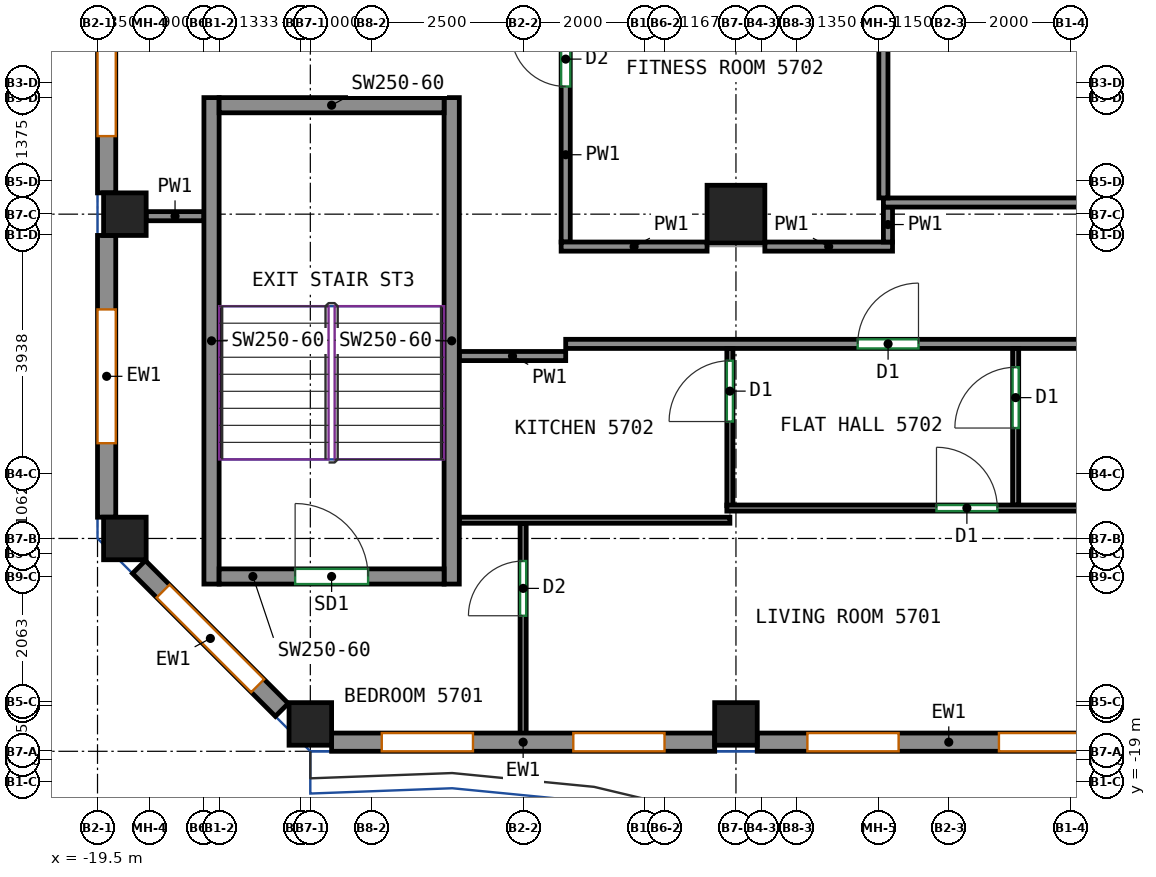
"""IFC4 building model, lengths in metres.
Left out: names, types, materials, properties, quantities, classifications, styles, units other than length and angle.
Written with IfcOpenShell. Run it as: python <this file> out.ifc"""

import sys

from ifc_helpers import new_model, si_unit, direction, frame, frame_2d, origin, origin_2d, place, context, subcontext, project, spatial, rectangle, extrude, source, transform, mapped, element, fill, save


model = new_model("IFC4")
c1 = context("Model", 3, precision=1e-05, world=origin(), true_north=direction((0.0, 1.0)))
c2 = subcontext(c1, "Body", "Model", "MODEL_VIEW")
j1 = project(units=[si_unit("LENGTHUNIT", "METRE"), si_unit("PLANEANGLEUNIT", "RADIAN")], contexts=[c1])
p1 = place(None, origin())
s1 = spatial("IfcSite", under=j1, at=p1, CompositionType="ELEMENT")
p2 = place(p1, origin())
s2 = spatial("IfcBuilding", under=s1, at=p2, CompositionType="ELEMENT")
p3 = place(p2, frame((0.0, 0.0, 239.0)))
s3 = spatial("IfcBuildingStorey", under=s2, at=p3, CompositionType="ELEMENT", Elevation=239.0)
m1 = source(origin(), c2, "Body", "SweptSolid", [
    extrude(rectangle(XDim=0.7, YDim=0.7, at=origin_2d()), origin(), (0.0, 0.0, 1.0), 3.12),
])
for number, where, z_axis, x_axis in (
    (1, (-19.05, -15.0, 0.0), (0.0, 0.0, 1.0), (1.0, 0.0, 0.0)),
    (2, (-19.05, -9.667, 0.0), (0.0, 0.0, 1.0), (1.0, 0.0, 0.0)),
    (3, (-16.0, -18.05, 0.0), (0.0, 0.0, 1.0), (1.0, 0.0, 0.0)),
    (4, (-9.0, -18.05, 0.0), (0.0, 0.0, 1.0), (1.0, 0.0, 0.0)),
):
    element("IfcColumn", number, at=place(p3, frame(where, z_axis=z_axis, x_axis=x_axis)), inside=s3, PredefinedType="COLUMN", context=c2, shape_type="MappedRepresentation", body=[
        mapped(m1, transform((0.0, 0.0, 0.0))),
    ])
m2 = source(origin(), c2, "Body", "SweptSolid", [
    extrude(rectangle(XDim=0.95, YDim=0.95, at=origin_2d()), origin(), (0.0, 0.0, 1.0), 3.12),
])
p4 = place(p3, frame((-9.0, -9.667, 0.0), z_axis=(0.0, 0.0, 1.0), x_axis=(1.0, 0.0, 0.0)))
e5 = element("IfcColumn", 5, at=p4, inside=s3, PredefinedType="COLUMN", context=c2, shape_type="MappedRepresentation", body=[
    mapped(m2, transform((0.0, 0.0, 0.0))),
])
m3 = source(origin(), c2, "Body", "SweptSolid", [
    extrude(rectangle(XDim=8.0, YDim=0.25, at=frame_2d((4.0, 0.0))), origin(), (0.0, 0.0, 1.0), 3.12),
])
for number, where, z_axis, x_axis in (
    (6, (-17.625, -15.75, 0.0), (0.0, 0.0, 1.0), (0.0, 1.0, 0.0)),
    (7, (-13.675, -15.75, 0.0), (0.0, 0.0, 1.0), (0.0, 1.0, 0.0)),
):
    element("IfcWall", number, at=place(p3, frame(where, z_axis=z_axis, x_axis=x_axis)), inside=s3, PredefinedType="SHEAR", context=c2, shape_type="MappedRepresentation", body=[
        mapped(m3, transform((0.0, 0.0, 0.0))),
    ])
m4 = source(origin(), c2, "Body", "SweptSolid", [
    extrude(rectangle(XDim=3.7, YDim=0.25, at=frame_2d((1.85, 0.0))), origin(), (0.0, 0.0, 1.0), 3.12),
])
p5 = place(p3, frame((-17.5, -15.625, 0.0), z_axis=(0.0, 0.0, 1.0), x_axis=(1.0, 0.0, 0.0)))
e8 = element("IfcWall", 8, at=p5, inside=s3, PredefinedType="SHEAR", context=c2, shape_type="MappedRepresentation", body=[
    mapped(m4, transform((0.0, 0.0, 0.0))),
])
p6 = place(p5, frame((1.25, 0.0, 0.0)))
e9 = element("IfcOpeningElement", 9, at=p6, cuts=e8, PredefinedType="OPENING", context=c2, shape_type="SweptSolid", body=[
    extrude(rectangle(XDim=1.2, YDim=2.1, at=frame_2d((0.6, 1.05))), frame((0.0, 0.135, 0.0), z_axis=(0.0, -1.0, 0.0), x_axis=(1.0, 0.0, 0.0)), (0.0, 0.0, 1.0), 0.27),
])
p7 = place(p3, frame((-17.5, -7.875, 0.0), z_axis=(0.0, 0.0, 1.0), x_axis=(1.0, 0.0, 0.0)))
e10 = element("IfcWall", 10, at=p7, inside=s3, PredefinedType="SHEAR", context=c2, shape_type="MappedRepresentation", body=[
    mapped(m4, transform((0.0, 0.0, 0.0))),
])
m5 = source(origin(), c2, "Body", "SweptSolid", [
    extrude(rectangle(XDim=6.3, YDim=0.3, at=frame_2d((3.15, 0.0))), origin(), (0.0, 0.0, 1.0), 3.12),
])
p8 = place(p3, frame((-15.65, -18.35, 0.0), z_axis=(0.0, 0.0, 1.0), x_axis=(1.0, 0.0, 0.0)))
e11 = element("IfcWall", 11, at=p8, inside=s3, PredefinedType="SOLIDWALL", context=c2, shape_type="MappedRepresentation", body=[
    mapped(m5, transform((0.0, 0.0, 0.0))),
])
p9 = place(p8, frame((0.825, 0.0, 0.8)))
e12 = element("IfcOpeningElement", 12, at=p9, cuts=e11, PredefinedType="OPENING", context=c2, shape_type="SweptSolid", body=[
    extrude(rectangle(XDim=1.5, YDim=2.05, at=frame_2d((0.75, 1.025))), frame((0.0, 0.16, 0.0), z_axis=(0.0, -1.0, 0.0), x_axis=(1.0, 0.0, 0.0)), (0.0, 0.0, 1.0), 0.32),
])
p10 = place(p8, frame((3.975, 0.0, 0.8)))
e13 = element("IfcOpeningElement", 13, at=p10, cuts=e11, PredefinedType="OPENING", context=c2, shape_type="SweptSolid", body=[
    extrude(rectangle(XDim=1.5, YDim=2.05, at=frame_2d((0.75, 1.025))), frame((0.0, 0.16, 0.0), z_axis=(0.0, -1.0, 0.0), x_axis=(1.0, 0.0, 0.0)), (0.0, 0.0, 1.0), 0.32),
])
p11 = place(p3, frame((-8.65, -18.35, 0.0), z_axis=(0.0, 0.0, 1.0), x_axis=(1.0, 0.0, 0.0)))
e14 = element("IfcWall", 14, at=p11, inside=s3, PredefinedType="SOLIDWALL", context=c2, shape_type="MappedRepresentation", body=[
    mapped(m5, transform((0.0, 0.0, 0.0))),
])
p12 = place(p11, frame((0.825, 0.0, 0.8)))
e15 = element("IfcOpeningElement", 15, at=p12, cuts=e14, PredefinedType="OPENING", context=c2, shape_type="SweptSolid", body=[
    extrude(rectangle(XDim=1.5, YDim=2.05, at=frame_2d((0.75, 1.025))), frame((0.0, 0.16, 0.0), z_axis=(0.0, -1.0, 0.0), x_axis=(1.0, 0.0, 0.0)), (0.0, 0.0, 1.0), 0.32),
])
p13 = place(p11, frame((3.975, 0.0, 0.8)))
e16 = element("IfcOpeningElement", 16, at=p13, cuts=e14, PredefinedType="OPENING", context=c2, shape_type="SweptSolid", body=[
    extrude(rectangle(XDim=1.5, YDim=2.05, at=frame_2d((0.75, 1.025))), frame((0.0, 0.16, 0.0), z_axis=(0.0, -1.0, 0.0), x_axis=(1.0, 0.0, 0.0)), (0.0, 0.0, 1.0), 0.32),
])
m6 = source(origin(), c2, "Body", "SweptSolid", [
    extrude(rectangle(XDim=8.133, YDim=0.3, at=frame_2d((4.067, 0.0))), origin(), (0.0, 0.0, 1.0), 3.12),
])
p14 = place(p3, frame((-19.35, -1.183, 0.0), z_axis=(0.0, 0.0, 1.0), x_axis=(0.0, -1.0, 0.0)))
e17 = element("IfcWall", 17, at=p14, inside=s3, PredefinedType="SOLIDWALL", context=c2, shape_type="MappedRepresentation", body=[
    mapped(m6, transform((0.0, 0.0, 0.0))),
])
p15 = place(p14, frame((0.933, 0.0, 0.8)))
e18 = element("IfcOpeningElement", 18, at=p15, cuts=e17, PredefinedType="OPENING", context=c2, shape_type="SweptSolid", body=[
    extrude(rectangle(XDim=2.2, YDim=2.05, at=frame_2d((1.1, 1.025))), frame((0.0, 0.16, 0.0), z_axis=(0.0, -1.0, 0.0), x_axis=(1.0, 0.0, 0.0)), (0.0, 0.0, 1.0), 0.32),
])
p16 = place(p14, frame((5.0, 0.0, 0.8)))
e19 = element("IfcOpeningElement", 19, at=p16, cuts=e17, PredefinedType="OPENING", context=c2, shape_type="SweptSolid", body=[
    extrude(rectangle(XDim=2.2, YDim=2.05, at=frame_2d((1.1, 1.025))), frame((0.0, 0.16, 0.0), z_axis=(0.0, -1.0, 0.0), x_axis=(1.0, 0.0, 0.0)), (0.0, 0.0, 1.0), 0.32),
])
m7 = source(origin(), c2, "Body", "SweptSolid", [
    extrude(rectangle(XDim=4.633, YDim=0.3, at=frame_2d((2.317, 0.0))), origin(), (0.0, 0.0, 1.0), 3.12),
])
p17 = place(p3, frame((-19.35, -10.017, 0.0), z_axis=(0.0, 0.0, 1.0), x_axis=(0.0, -1.0, 0.0)))
e20 = element("IfcWall", 20, at=p17, inside=s3, PredefinedType="SOLIDWALL", context=c2, shape_type="MappedRepresentation", body=[
    mapped(m7, transform((0.0, 0.0, 0.0))),
])
p18 = place(p17, frame((1.217, 0.0, 0.8)))
e21 = element("IfcOpeningElement", 21, at=p18, cuts=e20, PredefinedType="OPENING", context=c2, shape_type="SweptSolid", body=[
    extrude(rectangle(XDim=2.2, YDim=2.05, at=frame_2d((1.1, 1.025))), frame((0.0, 0.16, 0.0), z_axis=(0.0, -1.0, 0.0), x_axis=(1.0, 0.0, 0.0)), (0.0, 0.0, 1.0), 0.32),
])
m8 = source(origin(), c2, "Body", "SweptSolid", [
    extrude(rectangle(XDim=3.323, YDim=0.3, at=frame_2d((1.662, 0.0))), origin(), (0.0, 0.0, 1.0), 3.12),
])
p19 = place(p3, frame((-18.819, -15.469, 0.0), z_axis=(0.0, 0.0, 1.0), x_axis=(0.707070049321, -0.707143511144, 0.0)))
e22 = element("IfcWall", 22, at=p19, inside=s3, PredefinedType="SOLIDWALL", context=c2, shape_type="MappedRepresentation", body=[
    mapped(m8, transform((0.0, 0.0, 0.0))),
])
p20 = place(p19, frame((0.562, 0.0, 0.8)))
e23 = element("IfcOpeningElement", 23, at=p20, cuts=e22, PredefinedType="OPENING", context=c2, shape_type="SweptSolid", body=[
    extrude(rectangle(XDim=2.2, YDim=2.05, at=frame_2d((1.1, 1.025))), frame((0.0, 0.16, 0.0), z_axis=(0.0, -1.0, 0.0), x_axis=(1.0, 0.0, 0.0)), (0.0, 0.0, 1.0), 0.32),
])
p21 = place(p3, frame((-11.8, -11.8, 0.0), z_axis=(0.0, 0.0, 1.0), x_axis=(1.0, 0.0, 0.0)))
e24 = element("IfcWall", 24, at=p21, inside=s3, PredefinedType="PARTITIONING", context=c2, shape_type="SweptSolid", body=[
    extrude(rectangle(XDim=29.55, YDim=0.15, at=frame_2d((14.775, 0.0))), origin(), (0.0, 0.0, 1.0), 3.12),
])
p22 = place(p21, frame((4.802, 0.0, 0.0)))
e25 = element("IfcOpeningElement", 25, at=p22, cuts=e24, PredefinedType="OPENING", context=c2, shape_type="SweptSolid", body=[
    extrude(rectangle(XDim=1.0, YDim=2.1, at=frame_2d((0.5, 1.05))), frame((0.0, 0.085, 0.0), z_axis=(0.0, -1.0, 0.0), x_axis=(1.0, 0.0, 0.0)), (0.0, 0.0, 1.0), 0.17),
])
p23 = place(p21, frame((23.314, 0.0, 0.0)))
e26 = element("IfcOpeningElement", 26, at=p23, cuts=e24, PredefinedType="OPENING", context=c2, shape_type="SweptSolid", body=[
    extrude(rectangle(XDim=1.0, YDim=2.1, at=frame_2d((0.5, 1.05))), frame((0.0, 0.085, 0.0), z_axis=(0.0, -1.0, 0.0), x_axis=(1.0, 0.0, 0.0)), (0.0, 0.0, 1.0), 0.17),
])
p24 = place(p3, frame((-13.55, -12.0, 0.0), z_axis=(0.0, 0.0, 1.0), x_axis=(1.0, 0.0, 0.0)))
e27 = element("IfcWall", 27, at=p24, inside=s3, PredefinedType="PARTITIONING", context=c2, shape_type="SweptSolid", body=[
    extrude(rectangle(XDim=1.75, YDim=0.15, at=frame_2d((0.875, 0.0))), origin(), (0.0, 0.0, 1.0), 3.12),
])
p25 = place(p3, frame((-18.7, -9.7, 0.0), z_axis=(0.0, 0.0, 1.0), x_axis=(1.0, 0.0, 0.0)))
e28 = element("IfcWall", 28, at=p25, inside=s3, PredefinedType="PARTITIONING", context=c2, shape_type="SweptSolid", body=[
    extrude(rectangle(XDim=0.95, YDim=0.15, at=frame_2d((0.475, 0.0))), origin(), (0.0, 0.0, 1.0), 3.12),
])
p26 = place(p3, frame((-11.8, -10.125, 0.0), z_axis=(0.0, 0.0, 1.0), x_axis=(0.0, 1.0, 0.0)))
e29 = element("IfcWall", 29, at=p26, inside=s3, PredefinedType="PARTITIONING", context=c2, shape_type="SweptSolid", body=[
    extrude(rectangle(XDim=4.785, YDim=0.15, at=frame_2d((2.393, 0.0))), origin(), (0.0, 0.0, 1.0), 3.12),
])
p27 = place(p26, frame((2.558, 0.0, 0.0)))
e30 = element("IfcOpeningElement", 30, at=p27, cuts=e29, PredefinedType="OPENING", context=c2, shape_type="SweptSolid", body=[
    extrude(rectangle(XDim=0.9, YDim=2.1, at=frame_2d((0.45, 1.05))), frame((0.0, 0.085, 0.0), z_axis=(0.0, -1.0, 0.0), x_axis=(1.0, 0.0, 0.0)), (0.0, 0.0, 1.0), 0.17),
])
p28 = place(p3, frame((-8.525, -10.2, 0.0), z_axis=(0.0, 0.0, 1.0), x_axis=(1.0, 0.0, 0.0)))
e31 = element("IfcWall", 31, at=p28, inside=s3, PredefinedType="PARTITIONING", context=c2, shape_type="SweptSolid", body=[
    extrude(rectangle(XDim=2.1, YDim=0.15, at=frame_2d((1.05, 0.0))), origin(), (0.0, 0.0, 1.0), 3.12),
])
p29 = place(p3, frame((-11.875, -10.2, 0.0), z_axis=(0.0, 0.0, 1.0), x_axis=(1.0, 0.0, 0.0)))
e32 = element("IfcWall", 32, at=p29, inside=s3, PredefinedType="PARTITIONING", context=c2, shape_type="SweptSolid", body=[
    extrude(rectangle(XDim=2.4, YDim=0.15, at=frame_2d((1.2, 0.0))), origin(), (0.0, 0.0, 1.0), 3.12),
])
p30 = place(p3, frame((-6.5, -9.55, 0.0), z_axis=(0.0, 0.0, 1.0), x_axis=(0.0, -1.0, 0.0)))
e33 = element("IfcWall", 33, at=p30, inside=s3, PredefinedType="PARTITIONING", context=c2, shape_type="SweptSolid", body=[
    extrude(rectangle(XDim=0.575, YDim=0.15, at=frame_2d((0.288, 0.0))), origin(), (0.0, 0.0, 1.0), 3.12),
])
p31 = place(p3, frame((-9.1, -14.46, 0.0), z_axis=(0.0, 0.0, 1.0), x_axis=(0.0, 1.0, 0.0)))
e34 = element("IfcWall", 34, at=p31, inside=s3, PredefinedType="PARTITIONING", context=c2, shape_type="SweptSolid", body=[
    extrude(rectangle(XDim=2.583, YDim=0.1, at=frame_2d((1.292, 0.0))), origin(), (0.0, 0.0, 1.0), 3.12),
])
p32 = place(p31, frame((1.383, 0.0, 0.0)))
e35 = element("IfcOpeningElement", 35, at=p32, cuts=e34, PredefinedType="OPENING", context=c2, shape_type="SweptSolid", body=[
    extrude(rectangle(XDim=1.0, YDim=2.1, at=frame_2d((0.5, 1.05))), frame((0.0, 0.06, 0.0), z_axis=(0.0, -1.0, 0.0), x_axis=(1.0, 0.0, 0.0)), (0.0, 0.0, 1.0), 0.12),
])
p33 = place(p3, frame((-13.55, -14.7, 0.0), z_axis=(0.0, 0.0, 1.0), x_axis=(1.0, 0.0, 0.0)))
e36 = element("IfcWall", 36, at=p33, inside=s3, PredefinedType="PARTITIONING", context=c2, shape_type="SweptSolid", body=[
    extrude(rectangle(XDim=4.45, YDim=0.1, at=frame_2d((2.225, 0.0))), origin(), (0.0, 0.0, 1.0), 3.12),
])
p34 = place(p3, frame((-4.4, -14.45, 0.0), z_axis=(0.0, 0.0, 1.0), x_axis=(0.0, 1.0, 0.0)))
e37 = element("IfcWall", 37, at=p34, inside=s3, PredefinedType="PARTITIONING", context=c2, shape_type="SweptSolid", body=[
    extrude(rectangle(XDim=2.573, YDim=0.1, at=frame_2d((1.287, 0.0))), origin(), (0.0, 0.0, 1.0), 3.12),
])
p35 = place(p34, frame((1.266, 0.0, 0.0)))
e38 = element("IfcOpeningElement", 38, at=p35, cuts=e37, PredefinedType="OPENING", context=c2, shape_type="SweptSolid", body=[
    extrude(rectangle(XDim=1.0, YDim=2.1, at=frame_2d((0.5, 1.05))), frame((0.0, 0.06, 0.0), z_axis=(0.0, -1.0, 0.0), x_axis=(1.0, 0.0, 0.0)), (0.0, 0.0, 1.0), 0.12),
])
p36 = place(p3, frame((-9.15, -14.5, 0.0), z_axis=(0.0, 0.0, 1.0), x_axis=(1.0, 0.0, 0.0)))
e39 = element("IfcWall", 39, at=p36, inside=s3, PredefinedType="PARTITIONING", context=c2, shape_type="SweptSolid", body=[
    extrude(rectangle(XDim=14.25, YDim=0.1, at=frame_2d((7.125, 0.0))), origin(), (0.0, 0.0, 1.0), 3.12),
])
p37 = place(p36, frame((3.448, 0.0, 0.0)))
e40 = element("IfcOpeningElement", 40, at=p37, cuts=e39, PredefinedType="OPENING", context=c2, shape_type="SweptSolid", body=[
    extrude(rectangle(XDim=1.0, YDim=2.1, at=frame_2d((0.5, 1.05))), frame((0.0, 0.06, 0.0), z_axis=(0.0, -1.0, 0.0), x_axis=(1.0, 0.0, 0.0)), (0.0, 0.0, 1.0), 0.12),
])
p38 = place(p3, frame((-12.5, -18.25, 0.0), z_axis=(0.0, 0.0, 1.0), x_axis=(0.0, 1.0, 0.0)))
e41 = element("IfcWall", 41, at=p38, inside=s3, PredefinedType="PARTITIONING", context=c2, shape_type="SweptSolid", body=[
    extrude(rectangle(XDim=3.498, YDim=0.1, at=frame_2d((1.749, 0.0))), origin(), (0.0, 0.0, 1.0), 3.12),
])
p39 = place(p38, frame((1.979, 0.0, 0.0)))
e42 = element("IfcOpeningElement", 42, at=p39, cuts=e41, PredefinedType="OPENING", context=c2, shape_type="SweptSolid", body=[
    extrude(rectangle(XDim=0.9, YDim=2.1, at=frame_2d((0.45, 1.05))), frame((0.0, 0.06, 0.0), z_axis=(0.0, -1.0, 0.0), x_axis=(1.0, 0.0, 0.0)), (0.0, 0.0, 1.0), 0.12),
])
p40 = place(p3, frame((8.5, -9.475, 0.0), z_axis=(0.0, 0.0, 1.0), x_axis=(-1.0, 0.0, 0.0)))
e43 = element("IfcWall", 43, at=p40, inside=s3, PredefinedType="PARTITIONING", context=c2, shape_type="SweptSolid", body=[
    extrude(rectangle(XDim=15.075, YDim=0.15, at=frame_2d((7.538, 0.0))), origin(), (0.0, 0.0, 1.0), 3.12),
])
p41 = place(p3, frame((-6.575, -9.4, 0.0), z_axis=(0.0, 0.0, 1.0), x_axis=(0.0, 1.0, 0.0)))
e44 = element("IfcWall", 44, at=p41, inside=s3, PredefinedType="PARTITIONING", context=c2, shape_type="SweptSolid", body=[
    extrude(rectangle(XDim=15.0, YDim=0.15, at=frame_2d((7.5, 0.0))), origin(), (0.0, 0.0, 1.0), 3.12),
])
p42 = place(p9, origin())
e45 = element("IfcWindow", 45, at=p42, inside=s3, PartitioningType="SINGLE_PANEL", PredefinedType="WINDOW", context=c2, shape_type="SweptSolid", body=[
    extrude(rectangle(XDim=1.5, YDim=2.05, at=frame_2d((0.75, 1.025))), frame((0.0, 0.03, 0.0), z_axis=(0.0, -1.0, 0.0), x_axis=(1.0, 0.0, 0.0)), (0.0, 0.0, 1.0), 0.06),
])
fill(e12, e45)
p43 = place(p10, origin())
e46 = element("IfcWindow", 46, at=p43, inside=s3, PartitioningType="SINGLE_PANEL", PredefinedType="WINDOW", context=c2, shape_type="SweptSolid", body=[
    extrude(rectangle(XDim=1.5, YDim=2.05, at=frame_2d((0.75, 1.025))), frame((0.0, 0.03, 0.0), z_axis=(0.0, -1.0, 0.0), x_axis=(1.0, 0.0, 0.0)), (0.0, 0.0, 1.0), 0.06),
])
fill(e13, e46)
p44 = place(p12, origin())
e47 = element("IfcWindow", 47, at=p44, inside=s3, PartitioningType="SINGLE_PANEL", PredefinedType="WINDOW", context=c2, shape_type="SweptSolid", body=[
    extrude(rectangle(XDim=1.5, YDim=2.05, at=frame_2d((0.75, 1.025))), frame((0.0, 0.03, 0.0), z_axis=(0.0, -1.0, 0.0), x_axis=(1.0, 0.0, 0.0)), (0.0, 0.0, 1.0), 0.06),
])
fill(e15, e47)
p45 = place(p13, origin())
e48 = element("IfcWindow", 48, at=p45, inside=s3, PartitioningType="SINGLE_PANEL", PredefinedType="WINDOW", context=c2, shape_type="SweptSolid", body=[
    extrude(rectangle(XDim=1.5, YDim=2.05, at=frame_2d((0.75, 1.025))), frame((0.0, 0.03, 0.0), z_axis=(0.0, -1.0, 0.0), x_axis=(1.0, 0.0, 0.0)), (0.0, 0.0, 1.0), 0.06),
])
fill(e16, e48)
p46 = place(p16, origin())
e49 = element("IfcWindow", 49, at=p46, inside=s3, PartitioningType="SINGLE_PANEL", PredefinedType="WINDOW", context=c2, shape_type="SweptSolid", body=[
    extrude(rectangle(XDim=2.2, YDim=2.05, at=frame_2d((1.1, 1.025))), frame((0.0, 0.03, 0.0), z_axis=(0.0, -1.0, 0.0), x_axis=(1.0, 0.0, 0.0)), (0.0, 0.0, 1.0), 0.06),
])
fill(e19, e49)
p47 = place(p18, origin())
e50 = element("IfcWindow", 50, at=p47, inside=s3, PartitioningType="SINGLE_PANEL", PredefinedType="WINDOW", context=c2, shape_type="SweptSolid", body=[
    extrude(rectangle(XDim=2.2, YDim=2.05, at=frame_2d((1.1, 1.025))), frame((0.0, 0.03, 0.0), z_axis=(0.0, -1.0, 0.0), x_axis=(1.0, 0.0, 0.0)), (0.0, 0.0, 1.0), 0.06),
])
fill(e21, e50)
p48 = place(p20, origin())
e51 = element("IfcWindow", 51, at=p48, inside=s3, PartitioningType="SINGLE_PANEL", PredefinedType="WINDOW", context=c2, shape_type="SweptSolid", body=[
    extrude(rectangle(XDim=2.2, YDim=2.05, at=frame_2d((1.1, 1.025))), frame((0.0, 0.03, 0.0), z_axis=(0.0, -1.0, 0.0), x_axis=(1.0, 0.0, 0.0)), (0.0, 0.0, 1.0), 0.06),
])
fill(e23, e51)
p49 = place(p6, origin())
e52 = element("IfcDoor", 52, at=p49, inside=s3, OperationType="DOUBLE_DOOR_SINGLE_SWING", PredefinedType="DOOR", context=c2, shape_type="SweptSolid", body=[
    extrude(rectangle(XDim=1.2, YDim=2.1, at=frame_2d((0.6, 1.05))), frame((0.0, 0.025, 0.0), z_axis=(0.0, -1.0, 0.0), x_axis=(1.0, 0.0, 0.0)), (0.0, 0.0, 1.0), 0.05),
])
fill(e9, e52)
p50 = place(p39, origin())
e53 = element("IfcDoor", 53, at=p50, inside=s3, OperationType="SINGLE_SWING_LEFT", PredefinedType="DOOR", context=c2, shape_type="SweptSolid", body=[
    extrude(rectangle(XDim=0.9, YDim=2.1, at=frame_2d((0.45, 1.05))), frame((0.0, 0.025, 0.0), z_axis=(0.0, -1.0, 0.0), x_axis=(1.0, 0.0, 0.0)), (0.0, 0.0, 1.0), 0.05),
])
fill(e42, e53)
p51 = place(p37, origin())
e54 = element("IfcDoor", 54, at=p51, inside=s3, OperationType="SINGLE_SWING_LEFT", PredefinedType="DOOR", context=c2, shape_type="SweptSolid", body=[
    extrude(rectangle(XDim=1.0, YDim=2.1, at=frame_2d((0.5, 1.05))), frame((0.0, 0.025, 0.0), z_axis=(0.0, -1.0, 0.0), x_axis=(1.0, 0.0, 0.0)), (0.0, 0.0, 1.0), 0.05),
])
fill(e40, e54)
p52 = place(p35, origin())
e55 = element("IfcDoor", 55, at=p52, inside=s3, OperationType="SINGLE_SWING_LEFT", PredefinedType="DOOR", context=c2, shape_type="SweptSolid", body=[
    extrude(rectangle(XDim=1.0, YDim=2.1, at=frame_2d((0.5, 1.05))), frame((0.0, 0.025, 0.0), z_axis=(0.0, -1.0, 0.0), x_axis=(1.0, 0.0, 0.0)), (0.0, 0.0, 1.0), 0.05),
])
fill(e38, e55)
p53 = place(p32, origin())
e56 = element("IfcDoor", 56, at=p53, inside=s3, OperationType="SINGLE_SWING_LEFT", PredefinedType="DOOR", context=c2, shape_type="SweptSolid", body=[
    extrude(rectangle(XDim=1.0, YDim=2.1, at=frame_2d((0.5, 1.05))), frame((0.0, 0.025, 0.0), z_axis=(0.0, -1.0, 0.0), x_axis=(1.0, 0.0, 0.0)), (0.0, 0.0, 1.0), 0.05),
])
fill(e35, e56)
p54 = place(p22, origin())
e57 = element("IfcDoor", 57, at=p54, inside=s3, OperationType="SINGLE_SWING_RIGHT", PredefinedType="DOOR", context=c2, shape_type="SweptSolid", body=[
    extrude(rectangle(XDim=1.0, YDim=2.1, at=frame_2d((0.5, 1.05))), frame((0.0, 0.025, 0.0), z_axis=(0.0, -1.0, 0.0), x_axis=(1.0, 0.0, 0.0)), (0.0, 0.0, 1.0), 0.05),
])
fill(e25, e57)
p55 = place(p27, origin())
e58 = element("IfcDoor", 58, at=p55, inside=s3, OperationType="SINGLE_SWING_RIGHT", PredefinedType="DOOR", context=c2, shape_type="SweptSolid", body=[
    extrude(rectangle(XDim=0.9, YDim=2.1, at=frame_2d((0.45, 1.05))), frame((0.0, 0.025, 0.0), z_axis=(0.0, -1.0, 0.0), x_axis=(1.0, 0.0, 0.0)), (0.0, 0.0, 1.0), 0.05),
])
fill(e30, e58)
save(model, sys.argv[1])
